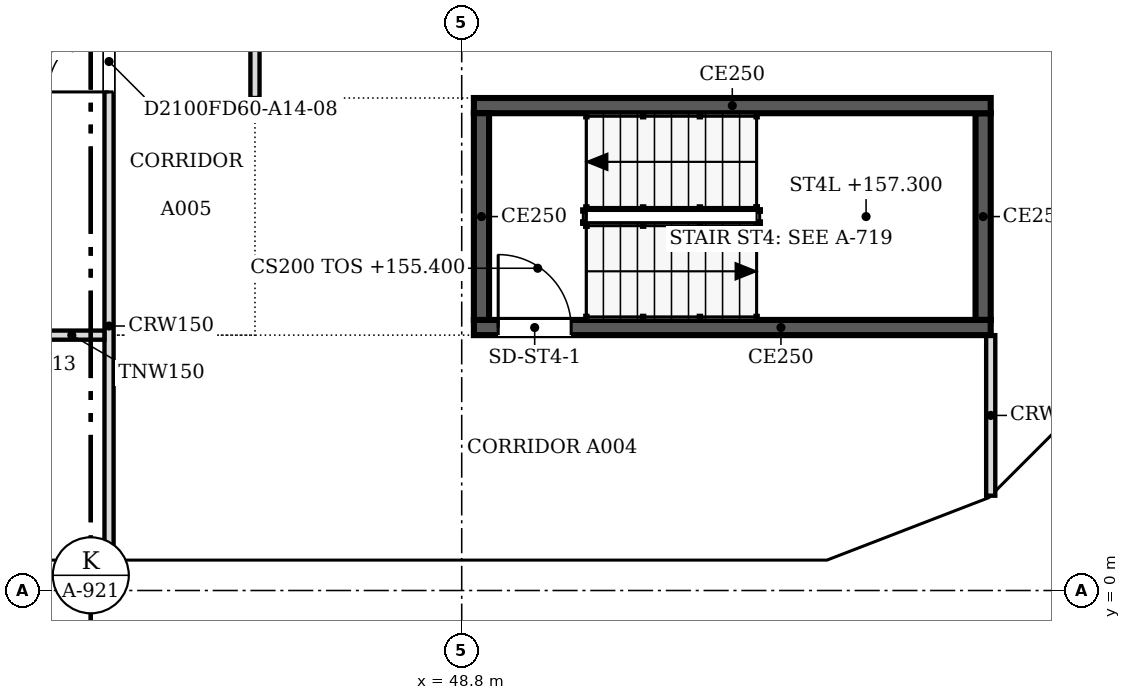
"""IFC4 building model, lengths in metres.
Left out: names, types, materials, properties, quantities, classifications, styles, units other than length and angle.
Written with IfcOpenShell. Run it as: python <this file> out.ifc"""

import sys

from ifc_helpers import new_model, si_unit, direction, frame, frame_2d, origin, place, context, subcontext, project, spatial, polyline, rectangle, outline, extrude, faceted_brep, source, transform, mapped, element, fill, save


model = new_model("IFC4")
c1 = context("Model", 3, precision=1e-05, world=origin(), true_north=direction((0.0, 1.0)))
c2 = subcontext(c1, "Body", "Model", "MODEL_VIEW")
j1 = project(units=[si_unit("LENGTHUNIT", "METRE"), si_unit("PLANEANGLEUNIT", "RADIAN")], contexts=[c1])
p1 = place(None, origin())
s1 = spatial("IfcSite", under=j1, at=p1, CompositionType="ELEMENT")
p2 = place(p1, origin())
s2 = spatial("IfcBuilding", under=s1, at=p2, CompositionType="ELEMENT")
p3 = place(p2, frame((0.0, 0.0, 155.4)))
s3 = spatial("IfcBuildingStorey", under=s2, at=p3, CompositionType="ELEMENT", Elevation=155.4)
m1 = source(origin(), c2, "Body", "SweptSolid", [
    extrude(outline(polyline([(6.1, 0.0), (3.05, 3.8), (0.0, 0.0), (6.1, 0.0)])), frame((0.0, 0.25, 0.0), z_axis=(0.0, -1.0, 0.0), x_axis=(1.0, 0.0, 0.0)), (0.0, 0.0, 1.0), 0.5),
])
p4 = place(p3, frame((39.65, 0.25, 0.0), z_axis=(0.0, 0.0, 1.0), x_axis=(1.0, 0.0, 0.0)))
e1 = element("IfcWall", 1, at=p4, inside=s3, PredefinedType="SOLIDWALL", context=c2, shape_type="MappedRepresentation", body=[
    mapped(m1, transform((0.0, 0.0, 0.0), scale=1.0)),
])
m2 = source(origin(), c2, "Body", "SweptSolid", [
    extrude(outline(polyline([(5.579, 0.25), (3.05, 3.401), (0.521, 0.25), (5.579, 0.25)])), frame((0.0, 0.26, 0.0), z_axis=(0.0, -1.0, 0.0), x_axis=(1.0, 0.0, 0.0)), (0.0, 0.0, 1.0), 0.52),
])
p5 = place(p4, origin())
e2 = element("IfcOpeningElement", 2, at=p5, cuts=e1, PredefinedType="OPENING", context=c2, shape_type="MappedRepresentation", body=[
    mapped(m2, transform((0.0, 0.0, 0.0), scale=1.0)),
])
p6 = place(p3, frame((45.75, 0.25, 0.0), z_axis=(0.0, 0.0, 1.0), x_axis=(1.0, 0.0, 0.0)))
e3 = element("IfcWall", 3, at=p6, inside=s3, PredefinedType="SOLIDWALL", context=c2, shape_type="MappedRepresentation", body=[
    mapped(m1, transform((0.0, 0.0, 0.0), scale=1.0)),
])
p7 = place(p6, origin())
e4 = element("IfcOpeningElement", 4, at=p7, cuts=e3, PredefinedType="OPENING", context=c2, shape_type="MappedRepresentation", body=[
    mapped(m2, transform((0.0, 0.0, 0.0), scale=1.0)),
])
m3 = source(origin(), c2, "Body", "Brep", [
    faceted_brep([(3.05, -0.25, 3.74), (3.003, -0.25, 3.8), (0.0, -0.25, 0.0), (3.05, -0.25, 0.0), (0.0, 0.25, 0.0), (2.957, 0.25, 3.741), (2.957, 0.25, 0.0), (3.003, 0.0, 3.8)], [[[0, 1, 2, 3]], [[4, 5, 6]], [[7, 1, 0]], [[5, 4, 2, 1, 7]], [[4, 6, 3, 2]], [[3, 6, 5, 7, 0]]]),
])
p8 = place(p3, frame((51.85, 0.25, 0.0), z_axis=(0.0, 0.0, 1.0), x_axis=(1.0, 0.0, 0.0)))
e5 = element("IfcWall", 5, at=p8, inside=s3, PredefinedType="SOLIDWALL", context=c2, shape_type="MappedRepresentation", body=[
    mapped(m3, transform((0.0, 0.0, 0.0), scale=1.0)),
])
m4 = source(origin(), c2, "Body", "SweptSolid", [
    extrude(outline(polyline([(2.803, 3.144), (0.516, 0.25), (2.803, 0.25), (2.803, 3.144)])), frame((0.0, 0.26, 0.0), z_axis=(0.0, -1.0, 0.0), x_axis=(1.0, 0.0, 0.0)), (0.0, 0.0, 1.0), 0.52),
])
p9 = place(p8, origin())
e6 = element("IfcOpeningElement", 6, at=p9, cuts=e5, PredefinedType="OPENING", context=c2, shape_type="MappedRepresentation", body=[
    mapped(m4, transform((0.0, 0.0, 0.0), scale=1.0)),
])
m5 = source(origin(), c2, "Body", "Brep", [
    faceted_brep([(2.997, -0.25, 0.0), (0.047, -0.25, 3.8), (0.0, -0.25, 3.741), (0.0, -0.25, 0.0), (0.093, 0.25, 3.74), (2.944, 0.25, 0.068), (2.944, 0.25, 0.0), (0.093, 0.25, 0.0), (0.047, 0.0, 3.8), (2.997, 0.0, 0.0)], [[[0, 1, 2, 3]], [[4, 5, 6, 7]], [[5, 4, 8, 1, 0, 9]], [[2, 1, 8]], [[7, 6, 9, 0, 3]], [[7, 3, 2, 8, 4]], [[9, 6, 5]]]),
])
p10 = place(p3, frame((54.81, 0.233, 0.0), z_axis=(0.0, 0.0, 1.0), x_axis=(0.932990326376, 0.359901446078, 0.0)))
e7 = element("IfcWall", 7, at=p10, inside=s3, PredefinedType="SOLIDWALL", context=c2, shape_type="MappedRepresentation", body=[
    mapped(m5, transform((0.0, 0.0, 0.0), scale=1.0)),
])
m6 = source(origin(), c2, "Body", "SweptSolid", [
    extrude(outline(polyline([(2.487, 0.25), (0.247, 3.135), (0.247, 0.25), (2.487, 0.25)])), frame((0.0, 0.26, 0.0), z_axis=(0.0, -1.0, 0.0), x_axis=(1.0, 0.0, 0.0)), (0.0, 0.0, 1.0), 0.52),
])
p11 = place(p10, origin())
e8 = element("IfcOpeningElement", 8, at=p11, cuts=e7, PredefinedType="OPENING", context=c2, shape_type="MappedRepresentation", body=[
    mapped(m6, transform((0.0, 0.0, 0.0), scale=1.0)),
])
m7 = source(origin(), c2, "Body", "Brep", [
    faceted_brep([(2.997, -0.25, 3.732), (2.944, -0.25, 3.8), (0.0, -0.25, 0.0), (2.997, -0.25, 0.0), (0.053, 0.25, 0.068), (2.891, 0.25, 3.732), (2.891, 0.25, 0.0), (0.053, 0.25, 0.0), (2.944, 0.0, 3.8), (0.0, 0.0, 0.0)], [[[0, 1, 2, 3]], [[4, 5, 6, 7]], [[8, 1, 0]], [[5, 4, 9, 2, 1, 8]], [[7, 6, 3, 2, 9]], [[7, 9, 4]], [[3, 6, 5, 8, 0]]]),
])
p12 = place(p3, frame((57.606, 1.312, 0.0), z_axis=(0.0, 0.0, 1.0), x_axis=(0.707147509625, 0.707066050402, 0.0)))
e9 = element("IfcWall", 9, at=p12, inside=s3, PredefinedType="SOLIDWALL", context=c2, shape_type="MappedRepresentation", body=[
    mapped(m7, transform((0.0, 0.0, 0.0), scale=1.0)),
])
m8 = source(origin(), c2, "Body", "SweptSolid", [
    extrude(outline(polyline([(2.744, 3.134), (0.51, 0.25), (2.744, 0.25), (2.744, 3.134)])), frame((0.0, 0.26, 0.0), z_axis=(0.0, -1.0, 0.0), x_axis=(1.0, 0.0, 0.0)), (0.0, 0.0, 1.0), 0.52),
])
p13 = place(p12, origin())
e10 = element("IfcOpeningElement", 10, at=p13, cuts=e9, PredefinedType="OPENING", context=c2, shape_type="MappedRepresentation", body=[
    mapped(m8, transform((0.0, 0.0, 0.0), scale=1.0)),
])
p14 = place(p2, frame((0.0, 0.0, 159.2)))
s4 = spatial("IfcBuildingStorey", under=s2, at=p14, CompositionType="ELEMENT", Elevation=159.2)
m9 = source(origin(), c2, "Body", "Brep", [
    faceted_brep([(3.05, -0.25, 0.0), (6.1, -0.25, 3.8), (6.1, -0.25, 3.8), (3.05, -0.25, 7.6), (0.0, -0.25, 3.8), (0.0, 0.25, 3.8), (3.05, 0.25, 7.6), (6.1, 0.25, 3.8), (6.1, 0.25, 3.8), (3.05, 0.25, 0.0)], [[[0, 1, 2, 3, 4]], [[5, 6, 7, 8, 9]], [[9, 8, 1, 0]], [[7, 6, 3, 2]], [[6, 5, 4, 3]], [[5, 9, 0, 4]], [[1, 8, 7, 2]]]),
])
p15 = place(p14, frame((36.6, 0.25, -3.8), z_axis=(0.0, 0.0, 1.0), x_axis=(1.0, 0.0, 0.0)))
e11 = element("IfcWall", 11, at=p15, inside=s4, PredefinedType="SOLIDWALL", context=c2, shape_type="MappedRepresentation", body=[
    mapped(m9, transform((0.0, 0.0, 0.0), scale=1.0)),
])
m10 = source(origin(), c2, "Body", "SweptSolid", [
    extrude(outline(polyline([(3.05, 0.399), (5.78, 3.8), (3.05, 7.201), (0.321, 3.8), (3.05, 0.399)])), frame((0.0, 0.26, 0.0), z_axis=(0.0, -1.0, 0.0), x_axis=(1.0, 0.0, 0.0)), (0.0, 0.0, 1.0), 0.52),
])
p16 = place(p15, origin())
e12 = element("IfcOpeningElement", 12, at=p16, cuts=e11, PredefinedType="OPENING", context=c2, shape_type="MappedRepresentation", body=[
    mapped(m10, transform((0.0, 0.0, 0.0), scale=1.0)),
])
m11 = source(origin(), c2, "Body", "SweptSolid", [
    extrude(outline(polyline([(3.05, 0.0), (6.1, 3.8), (3.05, 7.6), (0.0, 3.8), (3.05, 0.0)])), frame((0.0, 0.25, 0.0), z_axis=(0.0, -1.0, 0.0), x_axis=(1.0, 0.0, 0.0)), (0.0, 0.0, 1.0), 0.5),
])
p17 = place(p14, frame((42.7, 0.25, -3.8), z_axis=(0.0, 0.0, 1.0), x_axis=(1.0, 0.0, 0.0)))
e13 = element("IfcWall", 13, at=p17, inside=s4, PredefinedType="SOLIDWALL", context=c2, shape_type="MappedRepresentation", body=[
    mapped(m11, transform((0.0, 0.0, 0.0), scale=1.0)),
])
p18 = place(p17, origin())
e14 = element("IfcOpeningElement", 14, at=p18, cuts=e13, PredefinedType="OPENING", context=c2, shape_type="MappedRepresentation", body=[
    mapped(m10, transform((0.0, 0.0, 0.0), scale=1.0)),
])
m12 = source(origin(), c2, "Body", "Brep", [
    faceted_brep([(3.05, -0.25, 0.0), (6.053, -0.25, 3.8), (3.05, -0.25, 7.6), (0.0, -0.25, 3.8), (0.0, 0.25, 3.8), (3.05, 0.25, 7.6), (6.007, 0.25, 3.859), (6.007, 0.25, 3.741), (3.05, 0.25, 0.0), (6.053, 0.0, 3.8)], [[[0, 1, 2, 3]], [[4, 5, 6, 7, 8]], [[8, 7, 9, 1, 0]], [[6, 5, 2, 1, 9]], [[5, 4, 3, 2]], [[4, 8, 0, 3]], [[9, 7, 6]]]),
])
p19 = place(p14, frame((48.8, 0.25, -3.8), z_axis=(0.0, 0.0, 1.0), x_axis=(1.0, 0.0, 0.0)))
e15 = element("IfcWall", 15, at=p19, inside=s4, PredefinedType="SOLIDWALL", context=c2, shape_type="MappedRepresentation", body=[
    mapped(m12, transform((0.0, 0.0, 0.0), scale=1.0)),
])
m13 = source(origin(), c2, "Body", "SweptSolid", [
    extrude(outline(polyline([(3.049, 0.401), (5.735, 3.8), (3.049, 7.199), (0.321, 3.8), (3.049, 0.401)])), frame((0.0, 0.26, 0.0), z_axis=(0.0, -1.0, 0.0), x_axis=(1.0, 0.0, 0.0)), (0.0, 0.0, 1.0), 0.52),
])
p20 = place(p19, origin())
e16 = element("IfcOpeningElement", 16, at=p20, cuts=e15, PredefinedType="OPENING", context=c2, shape_type="MappedRepresentation", body=[
    mapped(m13, transform((0.0, 0.0, 0.0), scale=1.0)),
])
m14 = source(origin(), c2, "Body", "Brep", [
    faceted_brep([(2.95, -0.25, 0.0), (3.003, -0.25, 0.068), (3.003, -0.25, 7.532), (2.95, -0.25, 7.6), (0.0, -0.25, 3.8), (0.047, 0.25, 3.86), (2.898, 0.25, 7.532), (2.898, 0.25, 0.068), (0.047, 0.25, 3.74), (2.95, 0.0, 0.0), (2.95, 0.0, 7.6), (0.0, 0.0, 3.8)], [[[0, 1, 2, 3, 4]], [[5, 6, 7, 8]], [[1, 0, 9]], [[10, 3, 2]], [[6, 5, 11, 4, 3, 10]], [[8, 7, 9, 0, 4, 11]], [[8, 11, 5]], [[1, 9, 7, 6, 10, 2]]]),
])
p21 = place(p14, frame((54.854, 0.25, -3.8), z_axis=(0.0, 0.0, 1.0), x_axis=(0.932970071518, 0.359953949349, 0.0)))
e17 = element("IfcWall", 17, at=p21, inside=s4, PredefinedType="SOLIDWALL", context=c2, shape_type="MappedRepresentation", body=[
    mapped(m14, transform((0.0, 0.0, 0.0), scale=1.0)),
])
m15 = source(origin(), c2, "Body", "SweptSolid", [
    extrude(outline(polyline([(2.75, 6.935), (0.316, 3.8), (2.75, 0.665), (2.75, 6.935)])), frame((0.0, 0.26, 0.0), z_axis=(0.0, -1.0, 0.0), x_axis=(1.0, 0.0, 0.0)), (0.0, 0.0, 1.0), 0.52),
])
p22 = place(p21, origin())
e18 = element("IfcOpeningElement", 18, at=p22, cuts=e17, PredefinedType="OPENING", context=c2, shape_type="MappedRepresentation", body=[
    mapped(m15, transform((0.0, 0.0, 0.0), scale=1.0)),
])
m16 = source(origin(), c2, "Body", "Brep", [
    faceted_brep([(0.053, -0.25, 0.0), (2.997, -0.25, 3.8), (0.053, -0.25, 7.6), (0.0, -0.25, 7.532), (0.0, -0.25, 0.068), (0.106, 0.25, 7.532), (2.944, 0.25, 3.868), (2.944, 0.25, 3.732), (0.106, 0.25, 0.068), (2.997, 0.0, 3.8), (0.053, 0.0, 0.0), (0.053, 0.0, 7.6)], [[[0, 1, 2, 3, 4]], [[5, 6, 7, 8]], [[8, 7, 9, 1, 0, 10]], [[6, 5, 11, 2, 1, 9]], [[3, 2, 11]], [[10, 0, 4]], [[8, 10, 4, 3, 11, 5]], [[9, 7, 6]]]),
])
p23 = place(p14, frame((57.569, 1.274, -3.8), z_axis=(0.0, 0.0, 1.0), x_axis=(0.707066050402, 0.707147509625, 0.0)))
e19 = element("IfcWall", 19, at=p23, inside=s4, PredefinedType="SOLIDWALL", context=c2, shape_type="MappedRepresentation", body=[
    mapped(m16, transform((0.0, 0.0, 0.0), scale=1.0)),
])
m17 = source(origin(), c2, "Body", "SweptSolid", [
    extrude(outline(polyline([(0.253, 0.667), (2.681, 3.8), (0.253, 6.934), (0.253, 0.667)])), frame((0.0, 0.26, 0.0), z_axis=(0.0, -1.0, 0.0), x_axis=(1.0, 0.0, 0.0)), (0.0, 0.0, 1.0), 0.52),
])
p24 = place(p23, origin())
e20 = element("IfcOpeningElement", 20, at=p24, cuts=e19, PredefinedType="OPENING", context=c2, shape_type="MappedRepresentation", body=[
    mapped(m17, transform((0.0, 0.0, 0.0), scale=1.0)),
])
p25 = place(p3, frame((57.5, 4.325, 0.0), z_axis=(0.0, 0.0, 1.0), x_axis=(-1.0, 0.0, 0.0)))
e21 = element("IfcWall", 21, at=p25, inside=s3, PredefinedType="SOLIDWALL", context=c2, shape_type="SweptSolid", body=[
    extrude(rectangle(XDim=8.5, YDim=0.25, at=frame_2d((4.25, 0.0))), origin(), (0.0, 0.0, 1.0), 3.8),
])
m18 = source(origin(), c2, "Body", "SweptSolid", [
    extrude(rectangle(XDim=1.2, YDim=2.1, at=frame_2d((0.6, 1.05))), frame((0.0, 0.135, 0.0), z_axis=(0.0, -1.0, 0.0), x_axis=(1.0, 0.0, 0.0)), (0.0, 0.0, 1.0), 0.27),
])
p26 = place(p25, frame((6.9, 0.0, 0.0)))
e22 = element("IfcOpeningElement", 22, at=p26, cuts=e21, PredefinedType="OPENING", context=c2, shape_type="MappedRepresentation", body=[
    mapped(m18, transform((0.0, 0.0, 0.0), scale=1.0)),
])
p27 = place(p3, frame((49.125, 4.45, 0.0), z_axis=(0.0, 0.0, 1.0), x_axis=(0.0, 1.0, 0.0)))
e23 = element("IfcWall", 23, at=p27, inside=s3, PredefinedType="SOLIDWALL", context=c2, shape_type="SweptSolid", body=[
    extrude(rectangle(XDim=3.4, YDim=0.25, at=frame_2d((1.7, 0.0))), origin(), (0.0, 0.0, 1.0), 3.8),
])
p28 = place(p3, frame((49.0, 7.975, 0.0), z_axis=(0.0, 0.0, 1.0), x_axis=(1.0, 0.0, 0.0)))
e24 = element("IfcWall", 24, at=p28, inside=s3, PredefinedType="SOLIDWALL", context=c2, shape_type="SweptSolid", body=[
    extrude(rectangle(XDim=8.5, YDim=0.25, at=frame_2d((4.25, 0.0))), origin(), (0.0, 0.0, 1.0), 3.8),
])
p29 = place(p3, frame((57.375, 7.85, 0.0), z_axis=(0.0, 0.0, 1.0), x_axis=(0.0, -1.0, 0.0)))
e25 = element("IfcWall", 25, at=p29, inside=s3, PredefinedType="SOLIDWALL", context=c2, shape_type="SweptSolid", body=[
    extrude(rectangle(XDim=3.4, YDim=0.25, at=frame_2d((1.7, 0.0))), origin(), (0.0, 0.0, 1.0), 3.8),
])
p30 = place(p3, frame((43.0, 0.5, 0.0), z_axis=(0.0, 0.0, 1.0), x_axis=(0.0, 1.0, 0.0)))
e26 = element("IfcWall", 26, at=p30, inside=s3, PredefinedType="PARTITIONING", context=c2, shape_type="SweptSolid", body=[
    extrude(rectangle(XDim=21.424, YDim=0.15, at=frame_2d((10.712, 0.0))), origin(), (0.0, 0.0, 1.0), 3.067),
])
m19 = source(origin(), c2, "Body", "SweptSolid", [
    extrude(rectangle(XDim=1.0, YDim=2.1, at=frame_2d((0.5, 1.05))), frame((0.0, 0.085, 0.0), z_axis=(0.0, -1.0, 0.0), x_axis=(1.0, 0.0, 0.0)), (0.0, 0.0, 1.0), 0.17),
])
p31 = place(p30, frame((15.001, 0.0, 0.0)))
e27 = element("IfcOpeningElement", 27, at=p31, cuts=e26, PredefinedType="OPENING", context=c2, shape_type="MappedRepresentation", body=[
    mapped(m19, transform((0.0, 0.0, 0.0), scale=1.0)),
])
p32 = place(p30, frame((7.7, 0.0, 0.0)))
e28 = element("IfcOpeningElement", 28, at=p32, cuts=e26, PredefinedType="OPENING", context=c2, shape_type="MappedRepresentation", body=[
    mapped(m19, transform((0.0, 0.0, 0.0), scale=1.0)),
])
p33 = place(p3, frame((57.5, 1.559, 0.0), z_axis=(0.0, 0.0, 1.0), x_axis=(0.0, 1.0, 0.0)))
e29 = element("IfcWall", 29, at=p33, inside=s3, PredefinedType="PARTITIONING", context=c2, shape_type="SweptSolid", body=[
    extrude(rectangle(XDim=2.641, YDim=0.15, at=frame_2d((1.32, 0.0))), origin(), (0.0, 0.0, 1.0), 3.067),
])
p34 = place(p3, frame((42.924, 4.2, 0.0), z_axis=(0.0, 0.0, 1.0), x_axis=(-1.0, 0.0, 0.0)))
e30 = element("IfcWall", 30, at=p34, inside=s3, PredefinedType="PARTITIONING", context=c2, shape_type="SweptSolid", body=[
    extrude(rectangle(XDim=2.973, YDim=0.15, at=frame_2d((1.487, 0.0))), origin(), (0.0, 0.0, 1.0), 3.067),
])
m20 = source(origin(), c2, "Body", "SweptSolid", [
    extrude(rectangle(XDim=0.9, YDim=2.1, at=frame_2d((0.45, 1.05))), frame((0.0, 0.085, 0.0), z_axis=(0.0, -1.0, 0.0), x_axis=(1.0, 0.0, 0.0)), (0.0, 0.0, 1.0), 0.17),
])
p35 = place(p34, frame((1.073, 0.0, 0.0)))
e31 = element("IfcOpeningElement", 31, at=p35, cuts=e30, PredefinedType="OPENING", context=c2, shape_type="MappedRepresentation", body=[
    mapped(m20, transform((0.0, 0.0, 0.0), scale=1.0)),
])
p36 = place(p3, frame((45.4, 21.924, 0.0), z_axis=(0.0, 0.0, 1.0), x_axis=(0.0, -1.0, 0.0)))
e32 = element("IfcWall", 32, at=p36, inside=s3, PredefinedType="PARTITIONING", context=c2, shape_type="SweptSolid", body=[
    extrude(rectangle(XDim=13.824, YDim=0.15, at=frame_2d((6.912, 0.0))), origin(), (0.0, 0.0, 1.0), 3.067),
])
p37 = place(p36, frame((10.324, 0.0, 0.0)))
e33 = element("IfcOpeningElement", 33, at=p37, cuts=e32, PredefinedType="OPENING", context=c2, shape_type="MappedRepresentation", body=[
    mapped(m19, transform((0.0, 0.0, 0.0), scale=1.0)),
])
p38 = place(p36, frame((3.424, 0.0, 0.0)))
e34 = element("IfcOpeningElement", 34, at=p38, cuts=e32, PredefinedType="OPENING", context=c2, shape_type="MappedRepresentation", body=[
    mapped(m19, transform((0.0, 0.0, 0.0), scale=1.0)),
])
m21 = source(origin(), c2, "Body", "SweptSolid", [
    extrude(rectangle(XDim=1.2, YDim=2.1, at=frame_2d((0.6, 1.05))), frame((0.0, 0.025, 0.0), z_axis=(0.0, -1.0, 0.0), x_axis=(1.0, 0.0, 0.0)), (0.0, 0.0, 1.0), 0.05),
])
p39 = place(p26, origin())
e35 = element("IfcDoor", 35, at=p39, inside=s3, OperationType="SINGLE_SWING_RIGHT", PredefinedType="DOOR", context=c2, shape_type="MappedRepresentation", body=[
    mapped(m21, transform((0.0, 0.0, 0.0), scale=1.0)),
])
fill(e22, e35)
m22 = source(origin(), c2, "Body", "SweptSolid", [
    extrude(rectangle(XDim=1.0, YDim=2.1, at=frame_2d((0.5, 1.05))), frame((0.0, 0.025, 0.0), z_axis=(0.0, -1.0, 0.0), x_axis=(1.0, 0.0, 0.0)), (0.0, 0.0, 1.0), 0.05),
])
p40 = place(p32, origin())
e36 = element("IfcDoor", 36, at=p40, inside=s3, OperationType="SINGLE_SWING_LEFT", PredefinedType="DOOR", context=c2, shape_type="MappedRepresentation", body=[
    mapped(m22, transform((0.0, 0.0, 0.0), scale=1.0)),
])
fill(e28, e36)
save(model, sys.argv[1])
